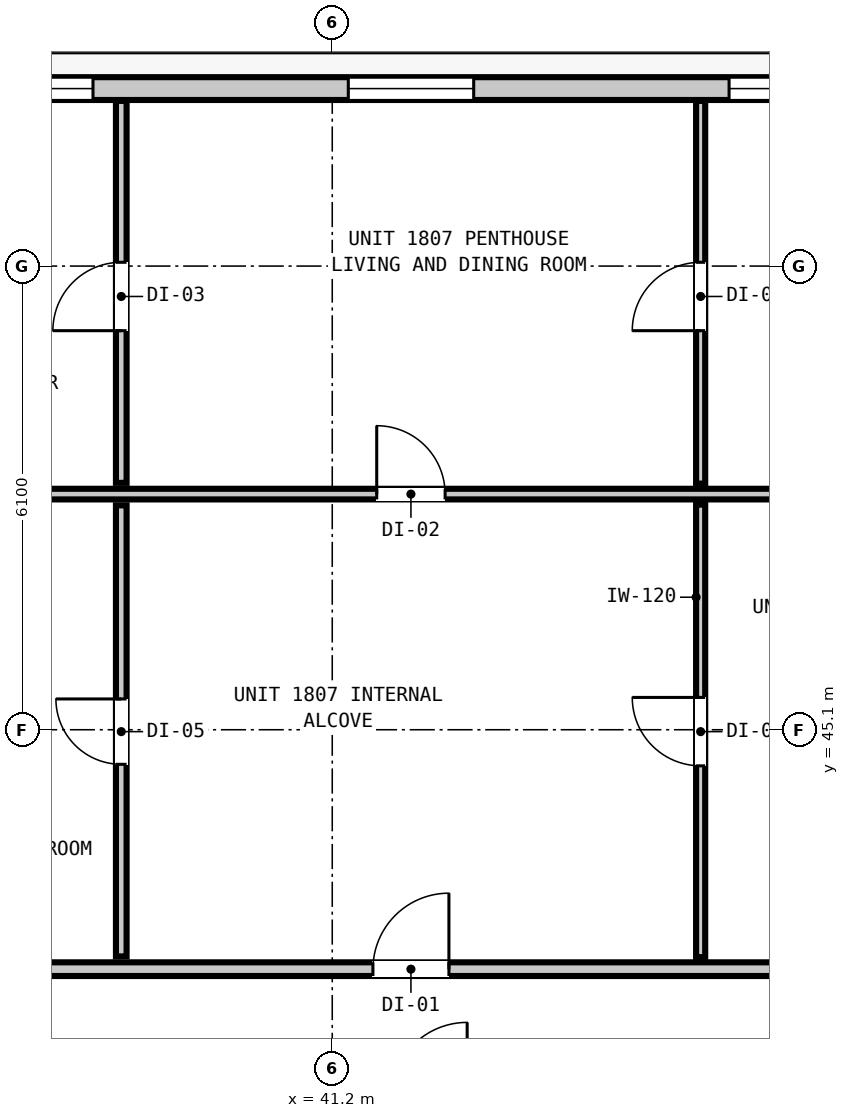
"""IFC4 building model, lengths in metres.
Left out: names, types, materials, properties, quantities, classifications, styles, units other than length and angle.
Written with IfcOpenShell. Run it as: python <this file> out.ifc"""

import sys

from ifc_helpers import new_model, si_unit, direction, frame, frame_2d, origin, place, context, subcontext, project, spatial, rectangle, extrude, element, fill, save


model = new_model("IFC4")
c1 = context("Model", 3, precision=1e-05, world=origin(), true_north=direction((0.0, 1.0)))
c2 = subcontext(c1, "Body", "Model", "MODEL_VIEW")
j1 = project(units=[si_unit("LENGTHUNIT", "METRE"), si_unit("PLANEANGLEUNIT", "RADIAN")], contexts=[c1])
p1 = place(None, origin())
s1 = spatial("IfcSite", under=j1, at=p1, CompositionType="ELEMENT")
p2 = place(p1, origin())
s2 = spatial("IfcBuilding", under=s1, at=p2, CompositionType="ELEMENT")
p3 = place(p2, frame((0.0, 0.0, 65.16)))
s3 = spatial("IfcBuildingStorey", under=s2, at=p3, CompositionType="ELEMENT", Elevation=65.16)
p4 = place(p3, frame((10.365, 53.535, 0.0), z_axis=(0.0, 0.0, 1.0), x_axis=(1.0, 0.0, 0.0)))
e1 = element("IfcWall", 1, at=p4, inside=s3, PredefinedType="STANDARD", context=c2, shape_type="SweptSolid", body=[
    extrude(rectangle(XDim=37.47, YDim=0.3, at=frame_2d((18.735, 0.0))), origin(), (0.0, 0.0, 1.0), 3.06),
])
p5 = place(p4, frame((6.504, 0.0, 0.0)))
e2 = element("IfcOpeningElement", 2, at=p5, cuts=e1, PredefinedType="OPENING", context=c2, shape_type="SweptSolid", body=[
    extrude(rectangle(XDim=1.0, YDim=2.15, at=frame_2d((0.5, 1.075))), frame((0.0, 0.16, 0.0), z_axis=(0.0, -1.0, 0.0), x_axis=(1.0, 0.0, 0.0)), (0.0, 0.0, 1.0), 0.32),
])
p6 = place(p4, frame((4.169, 0.0, 0.85)))
e3 = element("IfcOpeningElement", 3, at=p6, cuts=e1, PredefinedType="OPENING", context=c2, shape_type="SweptSolid", body=[
    extrude(rectangle(XDim=1.05, YDim=1.65, at=frame_2d((0.525, 0.825))), frame((0.0, 0.16, 0.0), z_axis=(0.0, -1.0, 0.0), x_axis=(1.0, 0.0, 0.0)), (0.0, 0.0, 1.0), 0.32),
])
p7 = place(p4, frame((13.81, 0.0, 0.85)))
e4 = element("IfcOpeningElement", 4, at=p7, cuts=e1, PredefinedType="OPENING", context=c2, shape_type="SweptSolid", body=[
    extrude(rectangle(XDim=1.65, YDim=1.75, at=frame_2d((0.825, 0.875))), frame((0.0, 0.16, 0.0), z_axis=(0.0, -1.0, 0.0), x_axis=(1.0, 0.0, 0.0)), (0.0, 0.0, 1.0), 0.32),
])
p8 = place(p4, frame((31.046, 0.0, 0.85)))
e5 = element("IfcOpeningElement", 5, at=p8, cuts=e1, PredefinedType="OPENING", context=c2, shape_type="SweptSolid", body=[
    extrude(rectangle(XDim=1.65, YDim=1.75, at=frame_2d((0.825, 0.875))), frame((0.0, 0.16, 0.0), z_axis=(0.0, -1.0, 0.0), x_axis=(1.0, 0.0, 0.0)), (0.0, 0.0, 1.0), 0.32),
])
p9 = place(p4, frame((27.107, 0.0, 0.85)))
e6 = element("IfcOpeningElement", 6, at=p9, cuts=e1, PredefinedType="OPENING", context=c2, shape_type="SweptSolid", body=[
    extrude(rectangle(XDim=0.58, YDim=1.5, at=frame_2d((0.29, 0.75))), frame((0.0, 0.16, 0.0), z_axis=(0.0, -1.0, 0.0), x_axis=(1.0, 0.0, 0.0)), (0.0, 0.0, 1.0), 0.32),
])
p10 = place(p4, frame((36.056, 0.0, 0.85)))
e7 = element("IfcOpeningElement", 7, at=p10, cuts=e1, PredefinedType="OPENING", context=c2, shape_type="SweptSolid", body=[
    extrude(rectangle(XDim=1.05, YDim=1.65, at=frame_2d((0.525, 0.825))), frame((0.0, 0.16, 0.0), z_axis=(0.0, -1.0, 0.0), x_axis=(1.0, 0.0, 0.0)), (0.0, 0.0, 1.0), 0.32),
])
p11 = place(p3, frame((8.027, 41.95, 0.0), z_axis=(0.0, 0.0, 1.0), x_axis=(1.0, 0.0, 0.0)))
e8 = element("IfcWall", 8, at=p11, inside=s3, PredefinedType="PARTITIONING", context=c2, shape_type="SweptSolid", body=[
    extrude(rectangle(XDim=42.146, YDim=0.18, at=frame_2d((21.073, 0.0))), origin(), (0.0, 0.0, 1.0), 3.06),
])
p12 = place(p11, frame((5.255, 0.0, 0.0)))
e9 = element("IfcOpeningElement", 9, at=p12, cuts=e8, PredefinedType="OPENING", context=c2, shape_type="SweptSolid", body=[
    extrude(rectangle(XDim=1.0, YDim=2.15, at=frame_2d((0.5, 1.075))), frame((0.0, 0.1, 0.0), z_axis=(0.0, -1.0, 0.0), x_axis=(1.0, 0.0, 0.0)), (0.0, 0.0, 1.0), 0.2),
])
p13 = place(p11, frame((16.943, 0.0, 0.0)))
e10 = element("IfcOpeningElement", 10, at=p13, cuts=e8, PredefinedType="OPENING", context=c2, shape_type="SweptSolid", body=[
    extrude(rectangle(XDim=1.0, YDim=2.15, at=frame_2d((0.5, 1.075))), frame((0.0, 0.1, 0.0), z_axis=(0.0, -1.0, 0.0), x_axis=(1.0, 0.0, 0.0)), (0.0, 0.0, 1.0), 0.2),
])
p14 = place(p11, frame((33.708, 0.0, 0.0)))
e11 = element("IfcOpeningElement", 11, at=p14, cuts=e8, PredefinedType="OPENING", context=c2, shape_type="SweptSolid", body=[
    extrude(rectangle(XDim=1.0, YDim=2.15, at=frame_2d((0.5, 1.075))), frame((0.0, 0.1, 0.0), z_axis=(0.0, -1.0, 0.0), x_axis=(1.0, 0.0, 0.0)), (0.0, 0.0, 1.0), 0.2),
])
p15 = place(p3, frame((19.12, 48.2, 0.0), z_axis=(0.0, 0.0, 1.0), x_axis=(1.0, 0.0, 0.0)))
e12 = element("IfcWall", 12, at=p15, inside=s3, PredefinedType="PARTITIONING", context=c2, shape_type="SweptSolid", body=[
    extrude(rectangle(XDim=31.053, YDim=0.14, at=frame_2d((15.526, 0.0))), origin(), (0.0, 0.0, 1.0), 3.06),
])
p16 = place(p15, frame((5.9, 0.0, 0.0)))
e13 = element("IfcOpeningElement", 13, at=p16, cuts=e12, PredefinedType="OPENING", context=c2, shape_type="SweptSolid", body=[
    extrude(rectangle(XDim=0.9, YDim=2.1, at=frame_2d((0.45, 1.05))), frame((0.0, 0.08, 0.0), z_axis=(0.0, -1.0, 0.0), x_axis=(1.0, 0.0, 0.0)), (0.0, 0.0, 1.0), 0.16),
])
p17 = place(p15, frame((22.665, 0.0, 0.0)))
e14 = element("IfcOpeningElement", 14, at=p17, cuts=e12, PredefinedType="OPENING", context=c2, shape_type="SweptSolid", body=[
    extrude(rectangle(XDim=0.9, YDim=2.1, at=frame_2d((0.45, 1.05))), frame((0.0, 0.08, 0.0), z_axis=(0.0, -1.0, 0.0), x_axis=(1.0, 0.0, 0.0)), (0.0, 0.0, 1.0), 0.16),
])
p18 = place(p3, frame((38.424, 42.118, 0.0), z_axis=(0.0, 0.0, 1.0), x_axis=(0.0, 1.0, 0.0)))
e15 = element("IfcWall", 15, at=p18, inside=s3, PredefinedType="PARTITIONING", context=c2, shape_type="SweptSolid", body=[
    extrude(rectangle(XDim=5.934, YDim=0.14, at=frame_2d((2.967, 0.0))), origin(), (0.0, 0.0, 1.0), 3.06),
])
p19 = place(p18, frame((2.527, 0.0, 0.0)))
e16 = element("IfcOpeningElement", 16, at=p19, cuts=e15, PredefinedType="OPENING", context=c2, shape_type="SweptSolid", body=[
    extrude(rectangle(XDim=0.86, YDim=2.02, at=frame_2d((0.43, 1.01))), frame((0.0, 0.08, 0.0), z_axis=(0.0, -1.0, 0.0), x_axis=(1.0, 0.0, 0.0)), (0.0, 0.0, 1.0), 0.16),
])
p20 = place(p3, frame((38.424, 48.348, 0.0), z_axis=(0.0, 0.0, 1.0), x_axis=(0.0, 1.0, 0.0)))
e17 = element("IfcWall", 17, at=p20, inside=s3, PredefinedType="PARTITIONING", context=c2, shape_type="SweptSolid", body=[
    extrude(rectangle(XDim=5.025, YDim=0.14, at=frame_2d((2.513, 0.0))), origin(), (0.0, 0.0, 1.0), 3.06),
])
p21 = place(p20, frame((2.002, 0.0, 0.0)))
e18 = element("IfcOpeningElement", 18, at=p21, cuts=e17, PredefinedType="OPENING", context=c2, shape_type="SweptSolid", body=[
    extrude(rectangle(XDim=0.9, YDim=2.1, at=frame_2d((0.45, 1.05))), frame((0.0, 0.08, 0.0), z_axis=(0.0, -1.0, 0.0), x_axis=(1.0, 0.0, 0.0)), (0.0, 0.0, 1.0), 0.16),
])
p22 = place(p3, frame((46.047, 42.108, 0.0), z_axis=(0.0, 0.0, 1.0), x_axis=(0.0, 1.0, 0.0)))
e19 = element("IfcWall", 19, at=p22, inside=s3, PredefinedType="PARTITIONING", context=c2, shape_type="SweptSolid", body=[
    extrude(rectangle(XDim=5.954, YDim=0.12, at=frame_2d((2.977, 0.0))), origin(), (0.0, 0.0, 1.0), 3.06),
])
p23 = place(p22, frame((2.517, 0.0, 0.0)))
e20 = element("IfcOpeningElement", 20, at=p23, cuts=e19, PredefinedType="OPENING", context=c2, shape_type="SweptSolid", body=[
    extrude(rectangle(XDim=0.9, YDim=2.1, at=frame_2d((0.45, 1.05))), frame((0.0, 0.07, 0.0), z_axis=(0.0, -1.0, 0.0), x_axis=(1.0, 0.0, 0.0)), (0.0, 0.0, 1.0), 0.14),
])
p24 = place(p3, frame((46.047, 48.338, 0.0), z_axis=(0.0, 0.0, 1.0), x_axis=(0.0, 1.0, 0.0)))
e21 = element("IfcWall", 21, at=p24, inside=s3, PredefinedType="PARTITIONING", context=c2, shape_type="SweptSolid", body=[
    extrude(rectangle(XDim=5.035, YDim=0.12, at=frame_2d((2.518, 0.0))), origin(), (0.0, 0.0, 1.0), 3.06),
])
p25 = place(p24, frame((2.012, 0.0, 0.0)))
e22 = element("IfcOpeningElement", 22, at=p25, cuts=e21, PredefinedType="OPENING", context=c2, shape_type="SweptSolid", body=[
    extrude(rectangle(XDim=0.9, YDim=2.1, at=frame_2d((0.45, 1.05))), frame((0.0, 0.07, 0.0), z_axis=(0.0, -1.0, 0.0), x_axis=(1.0, 0.0, 0.0)), (0.0, 0.0, 1.0), 0.14),
])
p26 = place(p8, origin())
e23 = element("IfcWindow", 23, at=p26, inside=s3, PartitioningType="SINGLE_PANEL", PredefinedType="WINDOW", context=c2, shape_type="SweptSolid", body=[
    extrude(rectangle(XDim=1.65, YDim=1.75, at=frame_2d((0.825, 0.875))), frame((0.0, 0.03, 0.0), z_axis=(0.0, -1.0, 0.0), x_axis=(1.0, 0.0, 0.0)), (0.0, 0.0, 1.0), 0.06),
])
fill(e5, e23)
p27 = place(p9, origin())
e24 = element("IfcWindow", 24, at=p27, inside=s3, PartitioningType="SINGLE_PANEL", PredefinedType="WINDOW", context=c2, shape_type="SweptSolid", body=[
    extrude(rectangle(XDim=0.58, YDim=1.5, at=frame_2d((0.29, 0.75))), frame((0.0, 0.03, 0.0), z_axis=(0.0, -1.0, 0.0), x_axis=(1.0, 0.0, 0.0)), (0.0, 0.0, 1.0), 0.06),
])
fill(e6, e24)
p28 = place(p10, origin())
e25 = element("IfcWindow", 25, at=p28, inside=s3, PartitioningType="SINGLE_PANEL", PredefinedType="WINDOW", context=c2, shape_type="SweptSolid", body=[
    extrude(rectangle(XDim=1.05, YDim=1.65, at=frame_2d((0.525, 0.825))), frame((0.0, 0.03, 0.0), z_axis=(0.0, -1.0, 0.0), x_axis=(1.0, 0.0, 0.0)), (0.0, 0.0, 1.0), 0.06),
])
fill(e7, e25)
p29 = place(p14, origin())
e26 = element("IfcDoor", 26, at=p29, inside=s3, OperationType="SINGLE_SWING_RIGHT", PredefinedType="DOOR", context=c2, shape_type="SweptSolid", body=[
    extrude(rectangle(XDim=1.0, YDim=2.15, at=frame_2d((0.5, 1.075))), frame((0.0, 0.025, 0.0), z_axis=(0.0, -1.0, 0.0), x_axis=(1.0, 0.0, 0.0)), (0.0, 0.0, 1.0), 0.05),
])
fill(e11, e26)
p30 = place(p17, origin())
e27 = element("IfcDoor", 27, at=p30, inside=s3, OperationType="SINGLE_SWING_LEFT", PredefinedType="DOOR", context=c2, shape_type="SweptSolid", body=[
    extrude(rectangle(XDim=0.9, YDim=2.1, at=frame_2d((0.45, 1.05))), frame((0.0, 0.025, 0.0), z_axis=(0.0, -1.0, 0.0), x_axis=(1.0, 0.0, 0.0)), (0.0, 0.0, 1.0), 0.05),
])
fill(e14, e27)
p31 = place(p19, origin())
e28 = element("IfcDoor", 28, at=p31, inside=s3, OperationType="SINGLE_SWING_RIGHT", PredefinedType="DOOR", context=c2, shape_type="SweptSolid", body=[
    extrude(rectangle(XDim=0.86, YDim=2.02, at=frame_2d((0.43, 1.01))), frame((0.0, 0.025, 0.0), z_axis=(0.0, -1.0, 0.0), x_axis=(1.0, 0.0, 0.0)), (0.0, 0.0, 1.0), 0.05),
])
fill(e16, e28)
p32 = place(p21, origin())
e29 = element("IfcDoor", 29, at=p32, inside=s3, OperationType="SINGLE_SWING_LEFT", PredefinedType="DOOR", context=c2, shape_type="SweptSolid", body=[
    extrude(rectangle(XDim=0.9, YDim=2.1, at=frame_2d((0.45, 1.05))), frame((0.0, 0.025, 0.0), z_axis=(0.0, -1.0, 0.0), x_axis=(1.0, 0.0, 0.0)), (0.0, 0.0, 1.0), 0.05),
])
fill(e18, e29)
p33 = place(p23, origin())
e30 = element("IfcDoor", 30, at=p33, inside=s3, OperationType="SINGLE_SWING_RIGHT", PredefinedType="DOOR", context=c2, shape_type="SweptSolid", body=[
    extrude(rectangle(XDim=0.9, YDim=2.1, at=frame_2d((0.45, 1.05))), frame((0.0, 0.025, 0.0), z_axis=(0.0, -1.0, 0.0), x_axis=(1.0, 0.0, 0.0)), (0.0, 0.0, 1.0), 0.05),
])
fill(e20, e30)
p34 = place(p25, origin())
e31 = element("IfcDoor", 31, at=p34, inside=s3, OperationType="SINGLE_SWING_LEFT", PredefinedType="DOOR", context=c2, shape_type="SweptSolid", body=[
    extrude(rectangle(XDim=0.9, YDim=2.1, at=frame_2d((0.45, 1.05))), frame((0.0, 0.025, 0.0), z_axis=(0.0, -1.0, 0.0), x_axis=(1.0, 0.0, 0.0)), (0.0, 0.0, 1.0), 0.05),
])
fill(e22, e31)
save(model, sys.argv[1])
